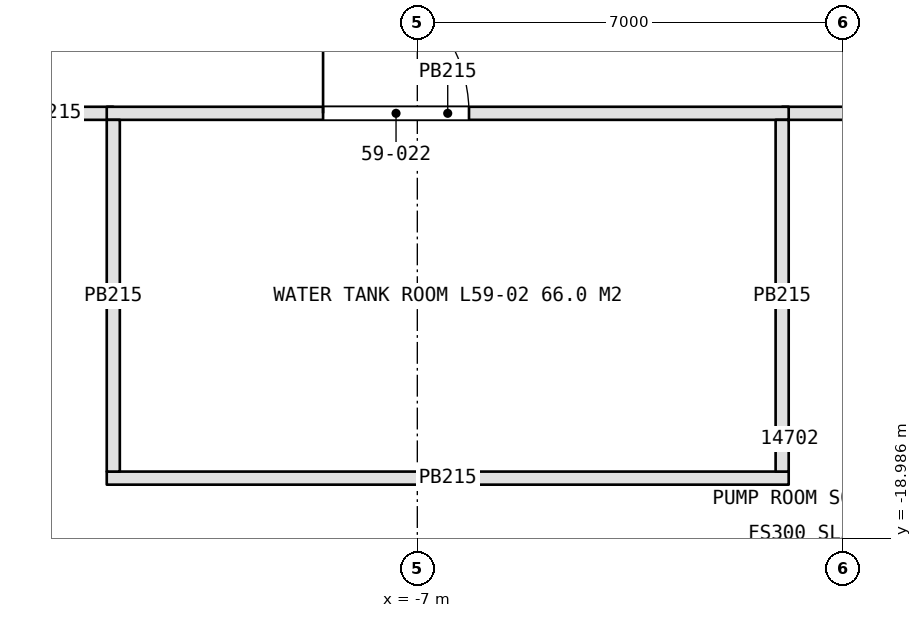
"""IFC4 building model, lengths in metres.
Left out: names, types, materials, properties, quantities, classifications, styles, units other than length and angle.
Written with IfcOpenShell. Run it as: python <this file> out.ifc"""

import sys

from ifc_helpers import new_model, si_unit, direction, frame, frame_2d, origin, place, context, subcontext, project, spatial, rectangle, extrude, element, fill, save


model = new_model("IFC4")
c1 = context("Model", 3, precision=1e-05, world=origin(), true_north=direction((0.0, 1.0)))
c2 = subcontext(c1, "Body", "Model", "MODEL_VIEW")
j1 = project(units=[si_unit("LENGTHUNIT", "METRE"), si_unit("PLANEANGLEUNIT", "RADIAN")], contexts=[c1])
p1 = place(None, origin())
s1 = spatial("IfcSite", under=j1, at=p1, CompositionType="ELEMENT")
p2 = place(p1, origin())
s2 = spatial("IfcBuilding", under=s1, at=p2, CompositionType="ELEMENT")
p3 = place(p2, frame((0.0, 0.0, 266.2)))
s3 = spatial("IfcBuildingStorey", under=s2, at=p3, CompositionType="ELEMENT", Elevation=266.2)
p4 = place(p3, frame((-14.0, -12.0, 0.0), z_axis=(0.0, 0.0, 1.0), x_axis=(1.0, 0.0, 0.0)))
e1 = element("IfcWall", 1, at=p4, inside=s3, PredefinedType="PARTITIONING", context=c2, shape_type="SweptSolid", body=[
    extrude(rectangle(XDim=2.0, YDim=0.215, at=frame_2d((1.0, 0.0))), origin(), (0.0, 0.0, 1.0), 4.2),
])
p5 = place(p3, frame((-1.0, -12.0, 0.0), z_axis=(0.0, 0.0, 1.0), x_axis=(1.0, 0.0, 0.0)))
e2 = element("IfcWall", 2, at=p5, inside=s3, PredefinedType="PARTITIONING", context=c2, shape_type="SweptSolid", body=[
    extrude(rectangle(XDim=3.0, YDim=0.215, at=frame_2d((1.5, 0.0))), origin(), (0.0, 0.0, 1.0), 4.2),
])
p6 = place(p5, frame((1.7, 0.0, 0.0)))
e3 = element("IfcOpeningElement", 3, at=p6, cuts=e2, PredefinedType="OPENING", context=c2, shape_type="SweptSolid", body=[
    extrude(rectangle(XDim=1.0, YDim=2.2, at=frame_2d((0.5, 1.1))), frame((0.0, 0.118, 0.0), z_axis=(0.0, -1.0, 0.0), x_axis=(1.0, 0.0, 0.0)), (0.0, 0.0, 1.0), 0.235),
])
p7 = place(p3, frame((-12.107, -18.0, 0.0), z_axis=(0.0, 0.0, 1.0), x_axis=(1.0, 0.0, 0.0)))
e4 = element("IfcWall", 4, at=p7, inside=s3, PredefinedType="PARTITIONING", context=c2, shape_type="SweptSolid", body=[
    extrude(rectangle(XDim=11.215, YDim=0.215, at=frame_2d((5.607, 0.0))), origin(), (0.0, 0.0, 1.0), 4.2),
])
p8 = place(p3, frame((-12.107, -12.0, 0.0), z_axis=(0.0, 0.0, 1.0), x_axis=(1.0, 0.0, 0.0)))
e5 = element("IfcWall", 5, at=p8, inside=s3, PredefinedType="PARTITIONING", context=c2, shape_type="SweptSolid", body=[
    extrude(rectangle(XDim=11.215, YDim=0.215, at=frame_2d((5.607, 0.0))), origin(), (0.0, 0.0, 1.0), 4.2),
])
p9 = place(p8, frame((3.558, 0.0, 0.0)))
e6 = element("IfcOpeningElement", 6, at=p9, cuts=e5, PredefinedType="OPENING", context=c2, shape_type="SweptSolid", body=[
    extrude(rectangle(XDim=2.4, YDim=2.4, at=frame_2d((1.2, 1.2))), frame((0.0, 0.118, 0.0), z_axis=(0.0, -1.0, 0.0), x_axis=(1.0, 0.0, 0.0)), (0.0, 0.0, 1.0), 0.235),
])
for number, where, z_axis, x_axis in (
    (7, (-12.0, -17.893, 0.0), (0.0, 0.0, 1.0), (0.0, 1.0, 0.0)),
    (8, (-1.0, -17.893, 0.0), (0.0, 0.0, 1.0), (0.0, 1.0, 0.0)),
):
    element("IfcWall", number, at=place(p3, frame(where, z_axis=z_axis, x_axis=x_axis)), inside=s3, PredefinedType="PARTITIONING", context=c2, shape_type="SweptSolid", body=[
        extrude(rectangle(XDim=5.785, YDim=0.215, at=frame_2d((2.893, 0.0))), origin(), (0.0, 0.0, 1.0), 4.2),
    ])
p10 = place(p9, origin())
e9 = element("IfcDoor", 9, at=p10, inside=s3, OperationType="DOUBLE_DOOR_SINGLE_SWING", PredefinedType="DOOR", context=c2, shape_type="SweptSolid", body=[
    extrude(rectangle(XDim=2.4, YDim=2.4, at=frame_2d((1.2, 1.2))), frame((0.0, 0.025, 0.0), z_axis=(0.0, -1.0, 0.0), x_axis=(1.0, 0.0, 0.0)), (0.0, 0.0, 1.0), 0.05),
])
fill(e6, e9)
save(model, sys.argv[1])
